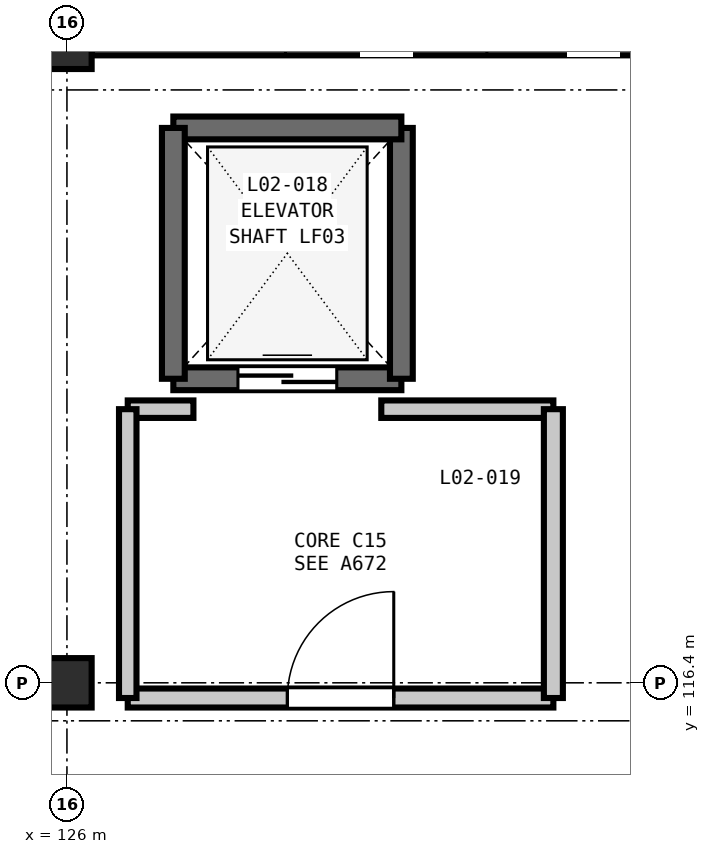
"""IFC4 building model, lengths in metres.
Left out: names, types, materials, properties, quantities, classifications, styles, units other than length and angle.
Written with IfcOpenShell. Run it as: python <this file> out.ifc"""

import sys

from ifc_helpers import new_model, si_unit, direction, frame, frame_2d, origin, origin_2d, place, context, subcontext, project, spatial, rectangle, extrude, element, fill, save


model = new_model("IFC4")
c1 = context("Model", 3, precision=1e-05, world=origin(), true_north=direction((0.0, 1.0)))
c2 = subcontext(c1, "Body", "Model", "MODEL_VIEW")
j1 = project(units=[si_unit("LENGTHUNIT", "METRE"), si_unit("PLANEANGLEUNIT", "RADIAN")], contexts=[c1])
p1 = place(None, origin())
s1 = spatial("IfcSite", under=j1, at=p1, CompositionType="ELEMENT")
p2 = place(p1, origin())
s2 = spatial("IfcBuilding", under=s1, at=p2, CompositionType="ELEMENT")
p3 = place(p2, frame((0.0, 0.0, 10.8)))
s3 = spatial("IfcBuildingStorey", under=s2, at=p3, CompositionType="ELEMENT", Elevation=10.8)
for number, where, z_axis, x_axis in (
    (1, (126.0, 116.4, 0.0), (0.0, 0.0, 1.0), (1.0, 0.0, 0.0)),
    (2, (126.0, 124.8, 0.0), (0.0, 0.0, 1.0), (1.0, 0.0, 0.0)),
):
    element("IfcColumn", number, at=place(p3, frame(where, z_axis=z_axis, x_axis=x_axis)), inside=s3, PredefinedType="COLUMN", context=c2, shape_type="SweptSolid", body=[
        extrude(rectangle(XDim=0.65, YDim=0.65, at=origin_2d()), origin(), (0.0, 0.0, 1.0), 5.4),
    ])
p4 = place(p3, frame((126.323, 124.8, 0.0), z_axis=(0.0, 0.0, 1.0), x_axis=(1.0, 0.0, 0.0)))
e3 = element("IfcWall", 3, at=p4, inside=s3, PredefinedType="SOLIDWALL", context=c2, shape_type="SweptSolid", body=[
    extrude(rectangle(XDim=7.754, YDim=0.29, at=frame_2d((3.877, 0.0))), origin(), (0.0, 0.0, 1.0), 4.68),
])
p5 = place(p4, frame((2.552, 0.0, 0.9)))
e4 = element("IfcOpeningElement", 4, at=p5, cuts=e3, PredefinedType="OPENING", context=c2, shape_type="SweptSolid", body=[
    extrude(rectangle(XDim=2.65, YDim=1.95, at=frame_2d((1.325, 0.975))), frame((0.0, 0.155, 0.0), z_axis=(0.0, -1.0, 0.0), x_axis=(1.0, 0.0, 0.0)), (0.0, 0.0, 1.0), 0.31),
])
p6 = place(p3, frame((127.4, 120.4, 0.0), z_axis=(0.0, 0.0, 1.0), x_axis=(1.0, 0.0, 0.0)))
e5 = element("IfcWall", 5, at=p6, inside=s3, PredefinedType="SHEAR", context=c2, shape_type="SweptSolid", body=[
    extrude(rectangle(XDim=3.0, YDim=0.3, at=frame_2d((1.5, 0.0))), origin(), (0.0, 0.0, 1.0), 5.4),
])
p7 = place(p6, frame((0.85, 0.0, 0.0)))
e6 = element("IfcOpeningElement", 6, at=p7, cuts=e5, PredefinedType="OPENING", context=c2, shape_type="SweptSolid", body=[
    extrude(rectangle(XDim=1.3, YDim=2.2, at=frame_2d((0.65, 1.1))), frame((0.0, 0.16, 0.0), z_axis=(0.0, -1.0, 0.0), x_axis=(1.0, 0.0, 0.0)), (0.0, 0.0, 1.0), 0.32),
])
p8 = place(p3, frame((130.4, 120.4, 0.0), z_axis=(0.0, 0.0, 1.0), x_axis=(0.0, 1.0, 0.0)))
e7 = element("IfcWall", 7, at=p8, inside=s3, PredefinedType="SHEAR", context=c2, shape_type="SweptSolid", body=[
    extrude(rectangle(XDim=3.3, YDim=0.3, at=frame_2d((1.65, 0.0))), origin(), (0.0, 0.0, 1.0), 5.4),
])
p9 = place(p3, frame((130.4, 123.7, 0.0), z_axis=(0.0, 0.0, 1.0), x_axis=(-1.0, 0.0, 0.0)))
e8 = element("IfcWall", 8, at=p9, inside=s3, PredefinedType="SHEAR", context=c2, shape_type="SweptSolid", body=[
    extrude(rectangle(XDim=3.0, YDim=0.3, at=frame_2d((1.5, 0.0))), origin(), (0.0, 0.0, 1.0), 5.4),
])
p10 = place(p3, frame((127.4, 123.7, 0.0), z_axis=(0.0, 0.0, 1.0), x_axis=(0.0, -1.0, 0.0)))
e9 = element("IfcWall", 9, at=p10, inside=s3, PredefinedType="SHEAR", context=c2, shape_type="SweptSolid", body=[
    extrude(rectangle(XDim=3.3, YDim=0.3, at=frame_2d((1.65, 0.0))), origin(), (0.0, 0.0, 1.0), 5.4),
])
p11 = place(p3, frame((126.8, 116.2, 0.0), z_axis=(0.0, 0.0, 1.0), x_axis=(1.0, 0.0, 0.0)))
e10 = element("IfcWall", 10, at=p11, inside=s3, PredefinedType="PARTITIONING", context=c2, shape_type="SweptSolid", body=[
    extrude(rectangle(XDim=5.6, YDim=0.25, at=frame_2d((2.8, 0.0))), origin(), (0.0, 0.0, 1.0), 4.735),
])
p12 = place(p11, frame((2.1, 0.0, 0.0)))
e11 = element("IfcOpeningElement", 11, at=p12, cuts=e10, PredefinedType="OPENING", context=c2, shape_type="SweptSolid", body=[
    extrude(rectangle(XDim=1.4, YDim=2.2, at=frame_2d((0.7, 1.1))), frame((0.0, 0.135, 0.0), z_axis=(0.0, -1.0, 0.0), x_axis=(1.0, 0.0, 0.0)), (0.0, 0.0, 1.0), 0.27),
])
p13 = place(p3, frame((130.136, 120.0, 0.0), z_axis=(0.0, 0.0, 1.0), x_axis=(1.0, 0.0, 0.0)))
e12 = element("IfcWall", 12, at=p13, inside=s3, PredefinedType="PARTITIONING", context=c2, shape_type="SweptSolid", body=[
    extrude(rectangle(XDim=2.264, YDim=0.23, at=frame_2d((1.132, 0.0))), origin(), (0.0, 0.0, 1.0), 5.07),
])
p14 = place(p3, frame((126.8, 120.0, 0.0), z_axis=(0.0, 0.0, 1.0), x_axis=(1.0, 0.0, 0.0)))
e13 = element("IfcWall", 13, at=p14, inside=s3, PredefinedType="PARTITIONING", context=c2, shape_type="SweptSolid", body=[
    extrude(rectangle(XDim=0.864, YDim=0.23, at=frame_2d((0.432, 0.0))), origin(), (0.0, 0.0, 1.0), 5.07),
])
p15 = place(p3, frame((126.8, 116.2, 0.0), z_axis=(0.0, 0.0, 1.0), x_axis=(0.0, 1.0, 0.0)))
e14 = element("IfcWall", 14, at=p15, inside=s3, PredefinedType="PARTITIONING", context=c2, shape_type="SweptSolid", body=[
    extrude(rectangle(XDim=3.8, YDim=0.23, at=frame_2d((1.9, 0.0))), origin(), (0.0, 0.0, 1.0), 5.07),
])
p16 = place(p3, frame((132.4, 116.2, 0.0), z_axis=(0.0, 0.0, 1.0), x_axis=(0.0, 1.0, 0.0)))
e15 = element("IfcWall", 15, at=p16, inside=s3, PredefinedType="PARTITIONING", context=c2, shape_type="SweptSolid", body=[
    extrude(rectangle(XDim=3.8, YDim=0.25, at=frame_2d((1.9, 0.0))), origin(), (0.0, 0.0, 1.0), 5.07),
])
p17 = place(p7, origin())
e16 = element("IfcDoor", 16, at=p17, inside=s3, OperationType="DOUBLE_DOOR_SLIDING", PredefinedType="DOOR", context=c2, shape_type="SweptSolid", body=[
    extrude(rectangle(XDim=1.3, YDim=2.2, at=frame_2d((0.65, 1.1))), frame((0.0, 0.025, 0.0), z_axis=(0.0, -1.0, 0.0), x_axis=(1.0, 0.0, 0.0)), (0.0, 0.0, 1.0), 0.05),
])
fill(e6, e16)
p18 = place(p12, origin())
e17 = element("IfcDoor", 17, at=p18, inside=s3, OperationType="SINGLE_SWING_RIGHT", PredefinedType="DOOR", context=c2, shape_type="SweptSolid", body=[
    extrude(rectangle(XDim=1.4, YDim=2.2, at=frame_2d((0.7, 1.1))), frame((0.0, 0.025, 0.0), z_axis=(0.0, -1.0, 0.0), x_axis=(1.0, 0.0, 0.0)), (0.0, 0.0, 1.0), 0.05),
])
fill(e11, e17)
save(model, sys.argv[1])
